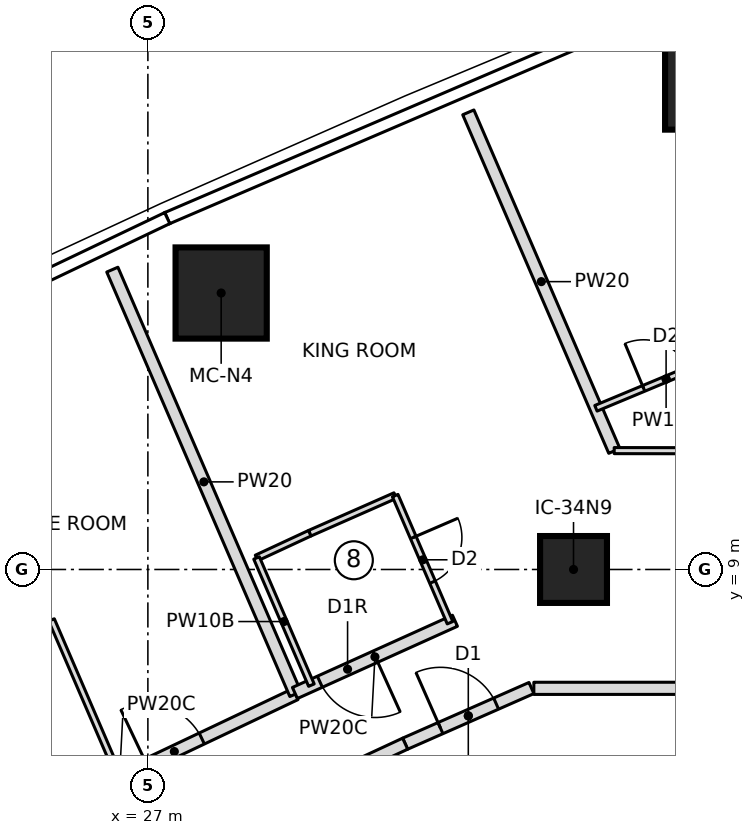
"""IFC4 building model, lengths in metres.
Left out: names, types, materials, properties, quantities, classifications, styles, units other than length and angle.
Written with IfcOpenShell. Run it as: python <this file> out.ifc"""

import sys

from ifc_helpers import new_model, si_unit, direction, frame, frame_2d, origin, origin_2d, place, context, subcontext, project, spatial, rectangle, extrude, element, fill, save


model = new_model("IFC4")
c1 = context("Model", 3, precision=1e-05, world=origin(), true_north=direction((0.0, 1.0)))
c2 = subcontext(c1, "Body", "Model", "MODEL_VIEW")
j1 = project(units=[si_unit("LENGTHUNIT", "METRE"), si_unit("PLANEANGLEUNIT", "RADIAN")], contexts=[c1])
p1 = place(None, origin())
s1 = spatial("IfcSite", under=j1, at=p1, CompositionType="ELEMENT")
p2 = place(p1, origin())
s2 = spatial("IfcBuilding", under=s1, at=p2, CompositionType="ELEMENT")
p3 = place(p2, frame((0.0, 0.0, 151.5)))
s3 = spatial("IfcBuildingStorey", under=s2, at=p3, CompositionType="ELEMENT", Elevation=151.5)
for number, where, z_axis, x_axis in (
    (1, (36.256, 16.984, 0.0), (0.0, 0.0, 1.0), (1.0, 0.0, 0.0)),
    (2, (28.205, 13.547, 0.0), (0.0, 0.0, 1.0), (1.0, 0.0, 0.0)),
):
    element("IfcColumn", number, at=place(p3, frame(where, z_axis=z_axis, x_axis=x_axis)), inside=s3, PredefinedType="COLUMN", context=c2, shape_type="SweptSolid", body=[
        extrude(rectangle(XDim=1.5, YDim=1.5, at=origin_2d()), origin(), (0.0, 0.0, 1.0), 3.55),
    ])
p4 = place(p3, frame((34.0, 9.0, 0.0), z_axis=(0.0, 0.0, 1.0), x_axis=(1.0, 0.0, 0.0)))
e3 = element("IfcColumn", 3, at=p4, inside=s3, PredefinedType="COLUMN", context=c2, shape_type="SweptSolid", body=[
    extrude(rectangle(XDim=1.1, YDim=1.1, at=origin_2d()), origin(), (0.0, 0.0, 1.0), 3.55),
])
p5 = place(p3, frame((23.64, 4.205, 0.0), z_axis=(0.0, 0.0, 1.0), x_axis=(0.90349162151, 0.428605751082, 0.0)))
e4 = element("IfcWall", 4, at=p5, inside=s3, PredefinedType="PARTITIONING", context=c2, shape_type="SweptSolid", body=[
    extrude(rectangle(XDim=6.404, YDim=0.2, at=frame_2d((3.202, 0.0))), origin(), (0.0, 0.0, 1.0), 3.25),
])
p6 = place(p5, frame((3.7, 0.0, 0.0)))
e5 = element("IfcOpeningElement", 5, at=p6, cuts=e4, PredefinedType="OPENING", context=c2, shape_type="SweptSolid", body=[
    extrude(rectangle(XDim=1.0, YDim=2.1, at=frame_2d((0.5, 1.05))), frame((0.0, 0.11, 0.0), z_axis=(0.0, -1.0, 0.0), x_axis=(1.0, 0.0, 0.0)), (0.0, 0.0, 1.0), 0.22),
])
p7 = place(p3, frame((22.538, 6.761, 0.0), z_axis=(0.0, 0.0, 1.0), x_axis=(0.898160376677, 0.439667985834, 0.0)))
e6 = element("IfcWall", 6, at=p7, inside=s3, PredefinedType="PARTITIONING", context=c2, shape_type="SweptSolid", body=[
    extrude(rectangle(XDim=3.203, YDim=0.1, at=frame_2d((1.602, 0.0))), origin(), (0.0, 0.0, 1.0), 3.25),
])
p8 = place(p7, frame((1.2, 0.0, 0.0)))
e7 = element("IfcOpeningElement", 7, at=p8, cuts=e6, PredefinedType="OPENING", context=c2, shape_type="SweptSolid", body=[
    extrude(rectangle(XDim=0.8, YDim=2.1, at=frame_2d((0.4, 1.05))), frame((0.0, 0.06, 0.0), z_axis=(0.0, -1.0, 0.0), x_axis=(1.0, 0.0, 0.0)), (0.0, 0.0, 1.0), 0.12),
])
p9 = place(p3, frame((25.416, 8.169, 0.0), z_axis=(0.0, 0.0, 1.0), x_axis=(0.395985125724, -0.918256924943, 0.0)))
e8 = element("IfcWall", 8, at=p9, inside=s3, PredefinedType="PARTITIONING", context=c2, shape_type="SweptSolid", body=[
    extrude(rectangle(XDim=2.78, YDim=0.1, at=frame_2d((1.39, 0.0))), origin(), (0.0, 0.0, 1.0), 3.25),
])
p10 = place(p3, frame((29.426, 6.95, 0.0), z_axis=(0.0, 0.0, 1.0), x_axis=(-0.396007233012, 0.918247391176, 0.0)))
e9 = element("IfcWall", 9, at=p10, inside=s3, PredefinedType="PARTITIONING", context=c2, shape_type="SweptSolid", body=[
    extrude(rectangle(XDim=7.603, YDim=0.2, at=frame_2d((3.801, 0.0))), origin(), (0.0, 0.0, 1.0), 3.25),
])
p11 = place(p3, frame((32.05, 8.157, 0.0), z_axis=(0.0, 0.0, 1.0), x_axis=(-0.9114145851, -0.411489312215, 0.0)))
e10 = element("IfcWall", 10, at=p11, inside=s3, PredefinedType="PARTITIONING", context=c2, shape_type="SweptSolid", body=[
    extrude(rectangle(XDim=2.888, YDim=0.2, at=frame_2d((1.444, 0.0))), origin(), (0.0, 0.0, 1.0), 3.25),
])
p12 = place(p11, frame((1.438, 0.0, 0.0)))
e11 = element("IfcOpeningElement", 11, at=p12, cuts=e10, PredefinedType="OPENING", context=c2, shape_type="SweptSolid", body=[
    extrude(rectangle(XDim=1.0, YDim=2.1, at=frame_2d((0.5, 1.05))), frame((0.0, 0.11, 0.0), z_axis=(0.0, -1.0, 0.0), x_axis=(1.0, 0.0, 0.0)), (0.0, 0.0, 1.0), 0.22),
])
p13 = place(p3, frame((28.787, 9.189, 0.0), z_axis=(0.0, 0.0, 1.0), x_axis=(0.906840099005, 0.421474832982, 0.0)))
e12 = element("IfcWall", 12, at=p13, inside=s3, PredefinedType="PARTITIONING", context=c2, shape_type="SweptSolid", body=[
    extrude(rectangle(XDim=0.967, YDim=0.1, at=frame_2d((0.483, 0.0))), origin(), (0.0, 0.0, 1.0), 3.25),
])
p14 = place(p3, frame((29.664, 9.597, 0.0), z_axis=(0.0, 0.0, 1.0), x_axis=(0.915061287592, 0.403314814942, 0.0)))
e13 = element("IfcWall", 13, at=p14, inside=s3, PredefinedType="PARTITIONING", context=c2, shape_type="SweptSolid", body=[
    extrude(rectangle(XDim=1.533, YDim=0.1, at=frame_2d((0.767, 0.0))), origin(), (0.0, 0.0, 1.0), 3.25),
])
p15 = place(p3, frame((31.067, 10.215, 0.0), z_axis=(0.0, 0.0, 1.0), x_axis=(0.395975890988, -0.918260907235, 0.0)))
e14 = element("IfcWall", 14, at=p15, inside=s3, PredefinedType="PARTITIONING", context=c2, shape_type="SweptSolid", body=[
    extrude(rectangle(XDim=2.277, YDim=0.1, at=frame_2d((1.138, 0.0))), origin(), (0.0, 0.0, 1.0), 3.25),
])
p16 = place(p15, frame((0.75, 0.0, 0.0)))
e15 = element("IfcOpeningElement", 15, at=p16, cuts=e14, PredefinedType="OPENING", context=c2, shape_type="SweptSolid", body=[
    extrude(rectangle(XDim=0.8, YDim=2.1, at=frame_2d((0.4, 1.05))), frame((0.0, 0.06, 0.0), z_axis=(0.0, -1.0, 0.0), x_axis=(1.0, 0.0, 0.0)), (0.0, 0.0, 1.0), 0.12),
])
p17 = place(p3, frame((29.689, 7.098, 0.0), z_axis=(0.0, 0.0, 1.0), x_axis=(-0.395910380035, 0.918289154341, 0.0)))
e16 = element("IfcWall", 16, at=p17, inside=s3, PredefinedType="PARTITIONING", context=c2, shape_type="SweptSolid", body=[
    extrude(rectangle(XDim=2.278, YDim=0.1, at=frame_2d((1.139, 0.0))), origin(), (0.0, 0.0, 1.0), 3.25),
])
p18 = place(p3, frame((34.671, 10.95, 0.0), z_axis=(0.0, 0.0, 1.0), x_axis=(-0.395978622303, 0.918259729422, 0.0)))
e17 = element("IfcWall", 17, at=p18, inside=s3, PredefinedType="PARTITIONING", context=c2, shape_type="SweptSolid", body=[
    extrude(rectangle(XDim=6.064, YDim=0.2, at=frame_2d((3.032, 0.0))), origin(), (0.0, 0.0, 1.0), 3.25),
])
p19 = place(p3, frame((34.369, 11.651, 0.0), z_axis=(0.0, 0.0, 1.0), x_axis=(0.923019129633, 0.384754059538, 0.0)))
e18 = element("IfcWall", 18, at=p19, inside=s3, PredefinedType="PARTITIONING", context=c2, shape_type="SweptSolid", body=[
    extrude(rectangle(XDim=2.5, YDim=0.1, at=frame_2d((1.25, 0.0))), origin(), (0.0, 0.0, 1.0), 3.25),
])
p20 = place(p19, frame((0.85, 0.0, 0.0)))
e19 = element("IfcOpeningElement", 19, at=p20, cuts=e18, PredefinedType="OPENING", context=c2, shape_type="SweptSolid", body=[
    extrude(rectangle(XDim=0.8, YDim=2.1, at=frame_2d((0.4, 1.05))), frame((0.0, 0.06, 0.0), z_axis=(0.0, -1.0, 0.0), x_axis=(1.0, 0.0, 0.0)), (0.0, 0.0, 1.0), 0.12),
])
p21 = place(p3, frame((31.231, 6.135, 0.0), z_axis=(0.0, 0.0, 1.0), x_axis=(0.915102334452, 0.403221672881, 0.0)))
e20 = element("IfcWall", 20, at=p21, inside=s3, PredefinedType="PARTITIONING", context=c2, shape_type="SweptSolid", body=[
    extrude(rectangle(XDim=2.269, YDim=0.2, at=frame_2d((1.135, 0.0))), origin(), (0.0, 0.0, 1.0), 3.25),
])
p22 = place(p21, frame((0.635, 0.0, 0.0)))
e21 = element("IfcOpeningElement", 21, at=p22, cuts=e20, PredefinedType="OPENING", context=c2, shape_type="SweptSolid", body=[
    extrude(rectangle(XDim=1.0, YDim=2.1, at=frame_2d((0.5, 1.05))), frame((0.0, 0.11, 0.0), z_axis=(0.0, -1.0, 0.0), x_axis=(1.0, 0.0, 0.0)), (0.0, 0.0, 1.0), 0.22),
])
p23 = place(p3, frame((29.875, 5.505, 0.0), z_axis=(0.0, 0.0, 1.0), x_axis=(0.90682850945, 0.421499768029, 0.0)))
e22 = element("IfcWall", 22, at=p23, inside=s3, PredefinedType="PARTITIONING", context=c2, shape_type="SweptSolid", body=[
    extrude(rectangle(XDim=1.496, YDim=0.2, at=frame_2d((0.748, 0.0))), origin(), (0.0, 0.0, 1.0), 3.25),
])
p24 = place(p3, frame((35.954, 10.953, 0.0), z_axis=(0.0, 0.0, 1.0), x_axis=(-0.999998845172, 0.001519755084, 0.0)))
e23 = element("IfcWall", 23, at=p24, inside=s3, PredefinedType="PARTITIONING", context=c2, shape_type="SweptSolid", body=[
    extrude(rectangle(XDim=1.285, YDim=0.1, at=frame_2d((0.643, 0.0))), origin(), (0.0, 0.0, 1.0), 3.25),
])
p25 = place(p3, frame((33.347, 7.045, 0.0), z_axis=(0.0, 0.0, 1.0), x_axis=(0.999999982426, 0.000187476562, 0.0)))
e24 = element("IfcWall", 24, at=p25, inside=s3, PredefinedType="PARTITIONING", context=c2, shape_type="SweptSolid", body=[
    extrude(rectangle(XDim=2.604, YDim=0.2, at=frame_2d((1.302, 0.0))), origin(), (0.0, 0.0, 1.0), 3.25),
])
p26 = place(p6, origin())
e25 = element("IfcDoor", 25, at=p26, inside=s3, OperationType="SINGLE_SWING_RIGHT", PredefinedType="DOOR", context=c2, shape_type="SweptSolid", body=[
    extrude(rectangle(XDim=1.0, YDim=2.1, at=frame_2d((0.5, 1.05))), frame((0.0, 0.025, 0.0), z_axis=(0.0, -1.0, 0.0), x_axis=(1.0, 0.0, 0.0)), (0.0, 0.0, 1.0), 0.05),
])
fill(e5, e25)
p27 = place(p16, origin())
e26 = element("IfcDoor", 26, at=p27, inside=s3, OperationType="SINGLE_SWING_LEFT", PredefinedType="DOOR", context=c2, shape_type="SweptSolid", body=[
    extrude(rectangle(XDim=0.8, YDim=2.1, at=frame_2d((0.4, 1.05))), frame((0.0, 0.025, 0.0), z_axis=(0.0, -1.0, 0.0), x_axis=(1.0, 0.0, 0.0)), (0.0, 0.0, 1.0), 0.05),
])
fill(e15, e26)
p28 = place(p12, origin())
e27 = element("IfcDoor", 27, at=p28, inside=s3, OperationType="SINGLE_SWING_RIGHT", PredefinedType="DOOR", context=c2, shape_type="SweptSolid", body=[
    extrude(rectangle(XDim=1.0, YDim=2.1, at=frame_2d((0.5, 1.05))), frame((0.0, 0.025, 0.0), z_axis=(0.0, -1.0, 0.0), x_axis=(1.0, 0.0, 0.0)), (0.0, 0.0, 1.0), 0.05),
])
fill(e11, e27)
p29 = place(p20, origin())
e28 = element("IfcDoor", 28, at=p29, inside=s3, OperationType="SINGLE_SWING_LEFT", PredefinedType="DOOR", context=c2, shape_type="SweptSolid", body=[
    extrude(rectangle(XDim=0.8, YDim=2.1, at=frame_2d((0.4, 1.05))), frame((0.0, 0.025, 0.0), z_axis=(0.0, -1.0, 0.0), x_axis=(1.0, 0.0, 0.0)), (0.0, 0.0, 1.0), 0.05),
])
fill(e19, e28)
p30 = place(p22, origin())
e29 = element("IfcDoor", 29, at=p30, inside=s3, OperationType="SINGLE_SWING_LEFT", PredefinedType="DOOR", context=c2, shape_type="SweptSolid", body=[
    extrude(rectangle(XDim=1.0, YDim=2.1, at=frame_2d((0.5, 1.05))), frame((0.0, 0.025, 0.0), z_axis=(0.0, -1.0, 0.0), x_axis=(1.0, 0.0, 0.0)), (0.0, 0.0, 1.0), 0.05),
])
fill(e21, e29)
save(model, sys.argv[1])
